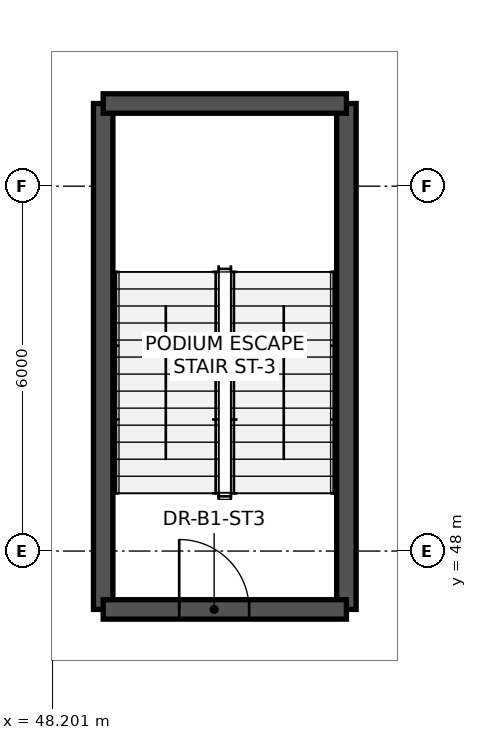
"""IFC4 building model, lengths in metres.
Left out: names, types, materials, properties, quantities, classifications, styles, units other than length and angle.
Written with IfcOpenShell. Run it as: python <this file> out.ifc"""

import sys

from ifc_helpers import new_model, si_unit, direction, frame, frame_2d, origin, place, context, subcontext, project, spatial, rectangle, extrude, element, fill, save


model = new_model("IFC4")
c1 = context("Model", 3, precision=1e-05, world=origin(), true_north=direction((0.0, 1.0)))
c2 = subcontext(c1, "Body", "Model", "MODEL_VIEW")
j1 = project(units=[si_unit("LENGTHUNIT", "METRE"), si_unit("PLANEANGLEUNIT", "RADIAN")], contexts=[c1])
p1 = place(None, origin())
s1 = spatial("IfcSite", under=j1, at=p1, CompositionType="ELEMENT")
p2 = place(p1, origin())
s2 = spatial("IfcBuilding", under=s1, at=p2, CompositionType="ELEMENT")
p3 = place(p2, frame((0.0, 0.0, -4.8)))
s3 = spatial("IfcBuildingStorey", under=s2, at=p3, CompositionType="ELEMENT", Elevation=-4.8)
for number, where, z_axis, x_axis in (
    (1, (49.04, 47.04, 0.0), (0.0, 0.0, 1.0), (0.0, 1.0, 0.0)),
    (2, (53.04, 47.04, 0.0), (0.0, 0.0, 1.0), (0.0, 1.0, 0.0)),
):
    element("IfcWall", number, at=place(p3, frame(where, z_axis=z_axis, x_axis=x_axis)), inside=s3, PredefinedType="SHEAR", context=c2, shape_type="SweptSolid", body=[
        extrude(rectangle(XDim=8.32, YDim=0.32, at=frame_2d((4.16, 0.0))), origin(), (0.0, 0.0, 1.0), 4.8),
    ])
p4 = place(p3, frame((49.04, 55.36, 0.0), z_axis=(0.0, 0.0, 1.0), x_axis=(1.0, 0.0, 0.0)))
e3 = element("IfcWall", 3, at=p4, inside=s3, PredefinedType="SHEAR", context=c2, shape_type="SweptSolid", body=[
    extrude(rectangle(XDim=4.0, YDim=0.32, at=frame_2d((2.0, 0.0))), origin(), (0.0, 0.0, 1.0), 4.8),
])
p5 = place(p3, frame((49.04, 47.04, 0.0), z_axis=(0.0, 0.0, 1.0), x_axis=(1.0, 0.0, 0.0)))
e4 = element("IfcWall", 4, at=p5, inside=s3, PredefinedType="SHEAR", context=c2, shape_type="SweptSolid", body=[
    extrude(rectangle(XDim=4.0, YDim=0.32, at=frame_2d((2.0, 0.0))), origin(), (0.0, 0.0, 1.0), 4.8),
])
p6 = place(p5, frame((1.25, 0.0, 0.0)))
e5 = element("IfcOpeningElement", 5, at=p6, cuts=e4, PredefinedType="OPENING", context=c2, shape_type="SweptSolid", body=[
    extrude(rectangle(XDim=1.15, YDim=2.15, at=frame_2d((0.575, 1.075))), frame((0.0, 0.17, 0.0), z_axis=(0.0, -1.0, 0.0), x_axis=(1.0, 0.0, 0.0)), (0.0, 0.0, 1.0), 0.34),
])
p7 = place(p6, origin())
e6 = element("IfcDoor", 6, at=p7, inside=s3, OperationType="SINGLE_SWING_LEFT", PredefinedType="DOOR", context=c2, shape_type="SweptSolid", body=[
    extrude(rectangle(XDim=1.15, YDim=2.15, at=frame_2d((0.575, 1.075))), frame((0.0, 0.025, 0.0), z_axis=(0.0, -1.0, 0.0), x_axis=(1.0, 0.0, 0.0)), (0.0, 0.0, 1.0), 0.05),
])
fill(e5, e6)
save(model, sys.argv[1])
